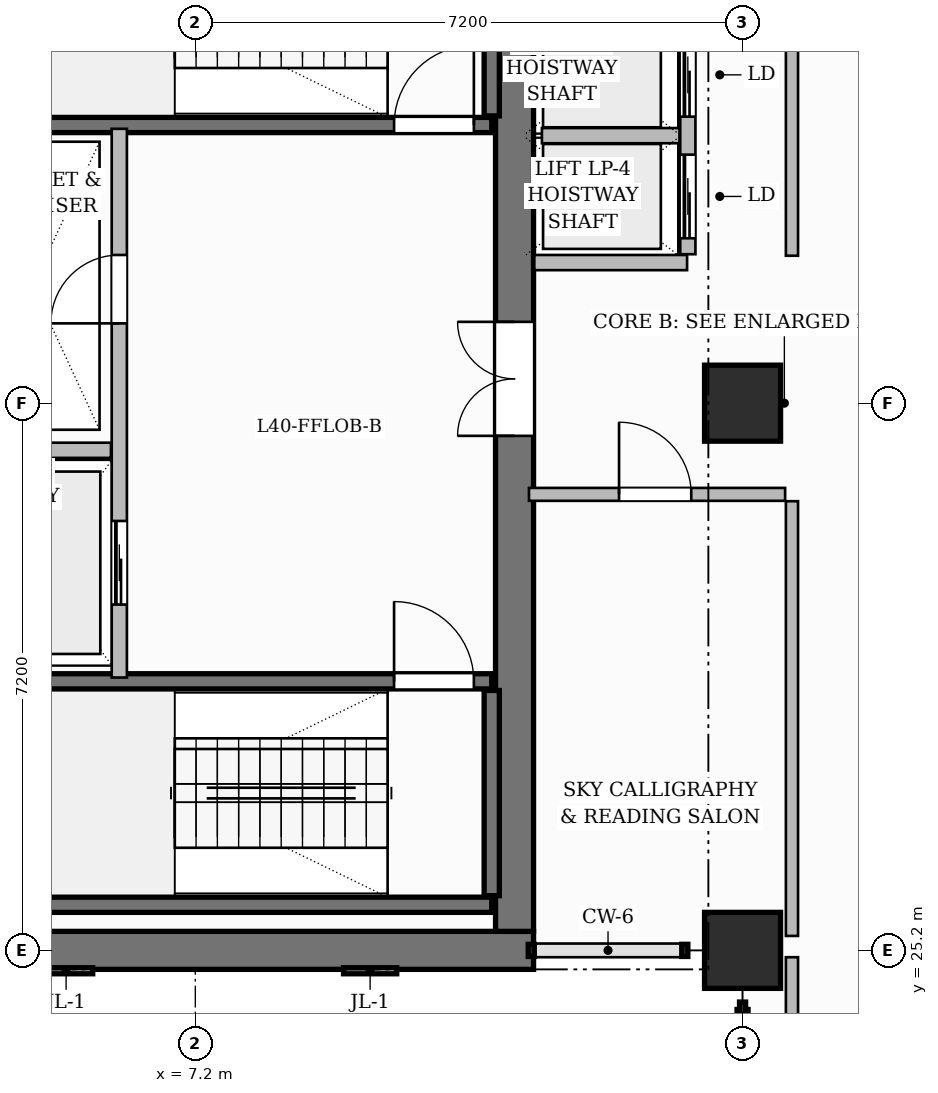
"""IFC4 building model, lengths in metres.
Left out: names, types, materials, properties, quantities, classifications, styles, units other than length and angle.
Written with IfcOpenShell. Run it as: python <this file> out.ifc"""

import sys

from ifc_helpers import new_model, si_unit, direction, frame, frame_2d, origin, origin_2d, place, context, subcontext, project, spatial, rectangle, extrude, source, transform, mapped, element, fill, save


model = new_model("IFC4")
c1 = context("Model", 3, precision=1e-05, world=origin(), true_north=direction((0.0, 1.0)))
c2 = subcontext(c1, "Body", "Model", "MODEL_VIEW")
j1 = project(units=[si_unit("LENGTHUNIT", "METRE"), si_unit("PLANEANGLEUNIT", "RADIAN")], contexts=[c1])
p1 = place(None, origin())
s1 = spatial("IfcSite", under=j1, at=p1, CompositionType="ELEMENT")
p2 = place(p1, origin())
s2 = spatial("IfcBuilding", under=s1, at=p2, CompositionType="ELEMENT")
p3 = place(p2, frame((0.0, 0.0, 161.85)))
s3 = spatial("IfcBuildingStorey", under=s2, at=p3, CompositionType="ELEMENT", Elevation=161.85)
p4 = place(p3, frame((3.35, 25.2, 0.0), z_axis=(0.0, 0.0, 1.0), x_axis=(1.0, 0.0, 0.0)))
e1 = element("IfcWall", 1, at=p4, inside=s3, PredefinedType="SHEAR", context=c2, shape_type="SweptSolid", body=[
    extrude(rectangle(XDim=8.3, YDim=0.5, at=frame_2d((4.15, 0.0))), origin(), (0.0, 0.0, 1.0), 3.85),
])
p5 = place(p3, frame((11.4, 25.45, 0.0), z_axis=(0.0, 0.0, 1.0), x_axis=(0.0, 1.0, 0.0)))
e2 = element("IfcWall", 2, at=p5, inside=s3, PredefinedType="SHEAR", context=c2, shape_type="SweptSolid", body=[
    extrude(rectangle(XDim=13.9, YDim=0.5, at=frame_2d((6.95, 0.0))), origin(), (0.0, 0.0, 1.0), 3.85),
])
p6 = place(p5, frame((6.52, 0.0, 0.0)))
e3 = element("IfcOpeningElement", 3, at=p6, cuts=e2, PredefinedType="OPENING", context=c2, shape_type="SweptSolid", body=[
    extrude(rectangle(XDim=1.5, YDim=2.2, at=frame_2d((0.75, 1.1))), frame((0.0, 0.26, 0.0), z_axis=(0.0, -1.0, 0.0), x_axis=(1.0, 0.0, 0.0)), (0.0, 0.0, 1.0), 0.52),
])
m1 = source(origin(), c2, "Body", "SweptSolid", [
    extrude(rectangle(XDim=1.0, YDim=1.0, at=origin_2d()), origin(), (0.0, 0.0, 1.0), 3.85),
])
for number, where, z_axis, x_axis in (
    (4, (14.4, 25.2, 0.0), (0.0, 0.0, 1.0), (1.0, 0.0, 0.0)),
    (5, (14.4, 32.4, 0.0), (0.0, 0.0, 1.0), (1.0, 0.0, 0.0)),
):
    element("IfcColumn", number, at=place(p3, frame(where, z_axis=z_axis, x_axis=x_axis)), inside=s3, PredefinedType="COLUMN", context=c2, shape_type="MappedRepresentation", body=[
        mapped(m1, transform((0.0, 0.0, 0.0), scale=1.0)),
    ])
p7 = place(p3, frame((4.0, 25.8, 0.0), z_axis=(0.0, 0.0, 1.0), x_axis=(1.0, 0.0, 0.0)))
e6 = element("IfcWall", 6, at=p7, inside=s3, PredefinedType="SHEAR", context=c2, shape_type="SweptSolid", body=[
    extrude(rectangle(XDim=7.1, YDim=0.2, at=frame_2d((3.55, 0.0))), origin(), (0.0, 0.0, 1.0), 3.85),
])
p8 = place(p3, frame((11.1, 25.92, 0.0), z_axis=(0.0, 0.0, 1.0), x_axis=(0.0, 1.0, 0.0)))
e7 = element("IfcWall", 7, at=p8, inside=s3, PredefinedType="SHEAR", context=c2, shape_type="SweptSolid", body=[
    extrude(rectangle(XDim=2.7, YDim=0.2, at=frame_2d((1.35, 0.0))), origin(), (0.0, 0.0, 1.0), 3.85),
])
p9 = place(p3, frame((4.0, 28.74, 0.0), z_axis=(0.0, 0.0, 1.0), x_axis=(1.0, 0.0, 0.0)))
e8 = element("IfcWall", 8, at=p9, inside=s3, PredefinedType="SHEAR", context=c2, shape_type="SweptSolid", body=[
    extrude(rectangle(XDim=7.1, YDim=0.2, at=frame_2d((3.55, 0.0))), origin(), (0.0, 0.0, 1.0), 3.85),
])
p10 = place(p9, frame((5.815, 0.0, 0.0)))
e9 = element("IfcOpeningElement", 9, at=p10, cuts=e8, PredefinedType="OPENING", context=c2, shape_type="SweptSolid", body=[
    extrude(rectangle(XDim=1.05, YDim=2.2, at=frame_2d((0.525, 1.1))), frame((0.0, 0.11, 0.0), z_axis=(0.0, -1.0, 0.0), x_axis=(1.0, 0.0, 0.0)), (0.0, 0.0, 1.0), 0.22),
])
p11 = place(p3, frame((11.1, 36.18, 0.0), z_axis=(0.0, 0.0, 1.0), x_axis=(0.0, 1.0, 0.0)))
e10 = element("IfcWall", 10, at=p11, inside=s3, PredefinedType="SHEAR", context=c2, shape_type="SweptSolid", body=[
    extrude(rectangle(XDim=2.7, YDim=0.2, at=frame_2d((1.35, 0.0))), origin(), (0.0, 0.0, 1.0), 3.85),
])
p12 = place(p3, frame((4.0, 36.06, 0.0), z_axis=(0.0, 0.0, 1.0), x_axis=(1.0, 0.0, 0.0)))
e11 = element("IfcWall", 11, at=p12, inside=s3, PredefinedType="SHEAR", context=c2, shape_type="SweptSolid", body=[
    extrude(rectangle(XDim=7.1, YDim=0.2, at=frame_2d((3.55, 0.0))), origin(), (0.0, 0.0, 1.0), 3.85),
])
p13 = place(p12, frame((5.815, 0.0, 0.0)))
e12 = element("IfcOpeningElement", 12, at=p13, cuts=e11, PredefinedType="OPENING", context=c2, shape_type="SweptSolid", body=[
    extrude(rectangle(XDim=1.05, YDim=2.2, at=frame_2d((0.525, 1.1))), frame((0.0, 0.11, 0.0), z_axis=(0.0, -1.0, 0.0), x_axis=(1.0, 0.0, 0.0)), (0.0, 0.0, 1.0), 0.22),
])
p14 = place(p3, frame((6.2, 28.79, 0.0), z_axis=(0.0, 0.0, 1.0), x_axis=(0.0, 1.0, 0.0)))
e13 = element("IfcWall", 13, at=p14, inside=s3, PredefinedType="PARTITIONING", context=c2, shape_type="SweptSolid", body=[
    extrude(rectangle(XDim=7.22, YDim=0.2, at=frame_2d((3.61, 0.0))), origin(), (0.0, 0.0, 1.0), 3.6),
])
p15 = place(p14, frame((4.66, 0.0, 0.0)))
e14 = element("IfcOpeningElement", 14, at=p15, cuts=e13, PredefinedType="OPENING", context=c2, shape_type="SweptSolid", body=[
    extrude(rectangle(XDim=0.9, YDim=2.1, at=frame_2d((0.45, 1.05))), frame((0.0, 0.11, 0.0), z_axis=(0.0, -1.0, 0.0), x_axis=(1.0, 0.0, 0.0)), (0.0, 0.0, 1.0), 0.22),
])
p16 = place(p14, frame((0.96, 0.0, 0.0)))
e15 = element("IfcOpeningElement", 15, at=p16, cuts=e13, PredefinedType="OPENING", context=c2, shape_type="SweptSolid", body=[
    extrude(rectangle(XDim=1.1, YDim=2.2, at=frame_2d((0.55, 1.1))), frame((0.0, 0.11, 0.0), z_axis=(0.0, -1.0, 0.0), x_axis=(1.0, 0.0, 0.0)), (0.0, 0.0, 1.0), 0.22),
])
p17 = place(p3, frame((3.96, 31.78, 0.0), z_axis=(0.0, 0.0, 1.0), x_axis=(1.0, 0.0, 0.0)))
e16 = element("IfcWall", 16, at=p17, inside=s3, PredefinedType="PARTITIONING", context=c2, shape_type="SweptSolid", body=[
    extrude(rectangle(XDim=2.13, YDim=0.2, at=frame_2d((1.065, 0.0))), origin(), (0.0, 0.0, 1.0), 3.6),
])
p18 = place(p3, frame((11.66, 34.25, 0.0), z_axis=(0.0, 0.0, 1.0), x_axis=(1.0, 0.0, 0.0)))
e17 = element("IfcWall", 17, at=p18, inside=s3, PredefinedType="PARTITIONING", context=c2, shape_type="SweptSolid", body=[
    extrude(rectangle(XDim=2.01, YDim=0.2, at=frame_2d((1.005, 0.0))), origin(), (0.0, 0.0, 1.0), 3.6),
])
p19 = place(p3, frame((13.68, 34.36, 0.0), z_axis=(0.0, 0.0, 1.0), x_axis=(0.0, 1.0, 0.0)))
e18 = element("IfcWall", 18, at=p19, inside=s3, PredefinedType="PARTITIONING", context=c2, shape_type="SweptSolid", body=[
    extrude(rectangle(XDim=4.72, YDim=0.2, at=frame_2d((2.36, 0.0))), origin(), (0.0, 0.0, 1.0), 3.6),
])
p20 = place(p19, frame((0.21, 0.0, 0.0)))
e19 = element("IfcOpeningElement", 19, at=p20, cuts=e18, PredefinedType="OPENING", context=c2, shape_type="SweptSolid", body=[
    extrude(rectangle(XDim=1.1, YDim=2.2, at=frame_2d((0.55, 1.1))), frame((0.0, 0.11, 0.0), z_axis=(0.0, -1.0, 0.0), x_axis=(1.0, 0.0, 0.0)), (0.0, 0.0, 1.0), 0.22),
])
p21 = place(p19, frame((1.81, 0.0, 0.0)))
e20 = element("IfcOpeningElement", 20, at=p21, cuts=e18, PredefinedType="OPENING", context=c2, shape_type="SweptSolid", body=[
    extrude(rectangle(XDim=1.1, YDim=2.2, at=frame_2d((0.55, 1.1))), frame((0.0, 0.11, 0.0), z_axis=(0.0, -1.0, 0.0), x_axis=(1.0, 0.0, 0.0)), (0.0, 0.0, 1.0), 0.22),
])
p22 = place(p19, frame((3.41, 0.0, 0.0)))
e21 = element("IfcOpeningElement", 21, at=p22, cuts=e18, PredefinedType="OPENING", context=c2, shape_type="SweptSolid", body=[
    extrude(rectangle(XDim=1.1, YDim=2.2, at=frame_2d((0.55, 1.1))), frame((0.0, 0.11, 0.0), z_axis=(0.0, -1.0, 0.0), x_axis=(1.0, 0.0, 0.0)), (0.0, 0.0, 1.0), 0.22),
])
p23 = place(p3, frame((11.76, 35.92, 0.0), z_axis=(0.0, 0.0, 1.0), x_axis=(1.0, 0.0, 0.0)))
e22 = element("IfcWall", 22, at=p23, inside=s3, PredefinedType="PARTITIONING", context=c2, shape_type="SweptSolid", body=[
    extrude(rectangle(XDim=1.81, YDim=0.2, at=frame_2d((0.905, 0.0))), origin(), (0.0, 0.0, 1.0), 3.6),
])
p24 = place(p3, frame((15.05, 11.16, 0.0), z_axis=(0.0, 0.0, 1.0), x_axis=(0.0, 1.0, 0.0)))
e23 = element("IfcWall", 23, at=p24, inside=s3, PredefinedType="PARTITIONING", context=c2, shape_type="SweptSolid", body=[
    extrude(rectangle(XDim=13.95, YDim=0.16, at=frame_2d((6.975, 0.0))), origin(), (0.0, 0.0, 1.0), 3.6),
])
p25 = place(p3, frame((15.05, 34.34, 0.0), z_axis=(0.0, 0.0, 1.0), x_axis=(0.0, 1.0, 0.0)))
e24 = element("IfcWall", 24, at=p25, inside=s3, PredefinedType="PARTITIONING", context=c2, shape_type="SweptSolid", body=[
    extrude(rectangle(XDim=5.22, YDim=0.16, at=frame_2d((2.61, 0.0))), origin(), (0.0, 0.0, 1.0), 3.6),
])
p26 = place(p3, frame((15.05, 25.39, 0.0), z_axis=(0.0, 0.0, 1.0), x_axis=(0.0, 1.0, 0.0)))
e25 = element("IfcWall", 25, at=p26, inside=s3, PredefinedType="PARTITIONING", context=c2, shape_type="SweptSolid", body=[
    extrude(rectangle(XDim=5.72, YDim=0.16, at=frame_2d((2.86, 0.0))), origin(), (0.0, 0.0, 1.0), 3.6),
])
p27 = place(p3, frame((11.59, 31.2, 0.0), z_axis=(0.0, 0.0, 1.0), x_axis=(1.0, 0.0, 0.0)))
e26 = element("IfcWall", 26, at=p27, inside=s3, PredefinedType="PARTITIONING", context=c2, shape_type="SweptSolid", body=[
    extrude(rectangle(XDim=3.37, YDim=0.17, at=frame_2d((1.685, 0.0))), origin(), (0.0, 0.0, 1.0), 3.6),
])
p28 = place(p27, frame((1.185, 0.0, 0.0)))
e27 = element("IfcOpeningElement", 27, at=p28, cuts=e26, PredefinedType="OPENING", context=c2, shape_type="SweptSolid", body=[
    extrude(rectangle(XDim=0.95, YDim=2.15, at=frame_2d((0.475, 1.075))), frame((0.0, 0.095, 0.0), z_axis=(0.0, -1.0, 0.0), x_axis=(1.0, 0.0, 0.0)), (0.0, 0.0, 1.0), 0.19),
])
m2 = source(origin(), c2, "Body", "SweptSolid", [
    extrude(rectangle(XDim=1.05, YDim=2.2, at=frame_2d((0.525, 1.1))), frame((0.0, 0.025, 0.0), z_axis=(0.0, -1.0, 0.0), x_axis=(1.0, 0.0, 0.0)), (0.0, 0.0, 1.0), 0.05),
])
p29 = place(p10, origin())
e28 = element("IfcDoor", 28, at=p29, inside=s3, OperationType="SINGLE_SWING_LEFT", PredefinedType="DOOR", context=c2, shape_type="MappedRepresentation", body=[
    mapped(m2, transform((0.0, 0.0, 0.0), scale=1.0)),
])
fill(e9, e28)
p30 = place(p13, origin())
e29 = element("IfcDoor", 29, at=p30, inside=s3, OperationType="SINGLE_SWING_RIGHT", PredefinedType="DOOR", context=c2, shape_type="MappedRepresentation", body=[
    mapped(m2, transform((0.0, 0.0, 0.0), scale=1.0)),
])
fill(e12, e29)
m3 = source(origin(), c2, "Body", "SweptSolid", [
    extrude(rectangle(XDim=0.9, YDim=2.1, at=frame_2d((0.45, 1.05))), frame((0.0, 0.025, 0.0), z_axis=(0.0, -1.0, 0.0), x_axis=(1.0, 0.0, 0.0)), (0.0, 0.0, 1.0), 0.05),
])
p31 = place(p15, origin())
e30 = element("IfcDoor", 30, at=p31, inside=s3, OperationType="SINGLE_SWING_LEFT", PredefinedType="DOOR", context=c2, shape_type="MappedRepresentation", body=[
    mapped(m3, transform((0.0, 0.0, 0.0), scale=1.0)),
])
fill(e14, e30)
m4 = source(origin(), c2, "Body", "SweptSolid", [
    extrude(rectangle(XDim=1.5, YDim=2.2, at=frame_2d((0.75, 1.1))), frame((0.0, 0.025, 0.0), z_axis=(0.0, -1.0, 0.0), x_axis=(1.0, 0.0, 0.0)), (0.0, 0.0, 1.0), 0.05),
])
p32 = place(p6, origin())
e31 = element("IfcDoor", 31, at=p32, inside=s3, OperationType="DOUBLE_DOOR_SINGLE_SWING", PredefinedType="DOOR", context=c2, shape_type="MappedRepresentation", body=[
    mapped(m4, transform((0.0, 0.0, 0.0), scale=1.0)),
])
fill(e3, e31)
m5 = source(origin(), c2, "Body", "SweptSolid", [
    extrude(rectangle(XDim=0.95, YDim=2.15, at=frame_2d((0.475, 1.075))), frame((0.0, 0.025, 0.0), z_axis=(0.0, -1.0, 0.0), x_axis=(1.0, 0.0, 0.0)), (0.0, 0.0, 1.0), 0.05),
])
p33 = place(p28, origin())
e32 = element("IfcDoor", 32, at=p33, inside=s3, OperationType="SINGLE_SWING_LEFT", PredefinedType="DOOR", context=c2, shape_type="MappedRepresentation", body=[
    mapped(m5, transform((0.0, 0.0, 0.0), scale=1.0)),
])
fill(e27, e32)
m6 = source(origin(), c2, "Body", "SweptSolid", [
    extrude(rectangle(XDim=1.1, YDim=2.2, at=frame_2d((0.55, 1.1))), frame((0.0, 0.025, 0.0), z_axis=(0.0, -1.0, 0.0), x_axis=(1.0, 0.0, 0.0)), (0.0, 0.0, 1.0), 0.05),
])
p34 = place(p16, origin())
e33 = element("IfcDoor", 33, at=p34, inside=s3, OperationType="SLIDING_TO_LEFT", PredefinedType="DOOR", context=c2, shape_type="MappedRepresentation", body=[
    mapped(m6, transform((0.0, 0.0, 0.0), scale=1.0)),
])
fill(e15, e33)
p35 = place(p20, origin())
e34 = element("IfcDoor", 34, at=p35, inside=s3, OperationType="SLIDING_TO_LEFT", PredefinedType="DOOR", context=c2, shape_type="MappedRepresentation", body=[
    mapped(m6, transform((0.0, 0.0, 0.0), scale=1.0)),
])
fill(e19, e34)
p36 = place(p21, origin())
e35 = element("IfcDoor", 35, at=p36, inside=s3, OperationType="SLIDING_TO_LEFT", PredefinedType="DOOR", context=c2, shape_type="MappedRepresentation", body=[
    mapped(m6, transform((0.0, 0.0, 0.0), scale=1.0)),
])
fill(e20, e35)
save(model, sys.argv[1])
